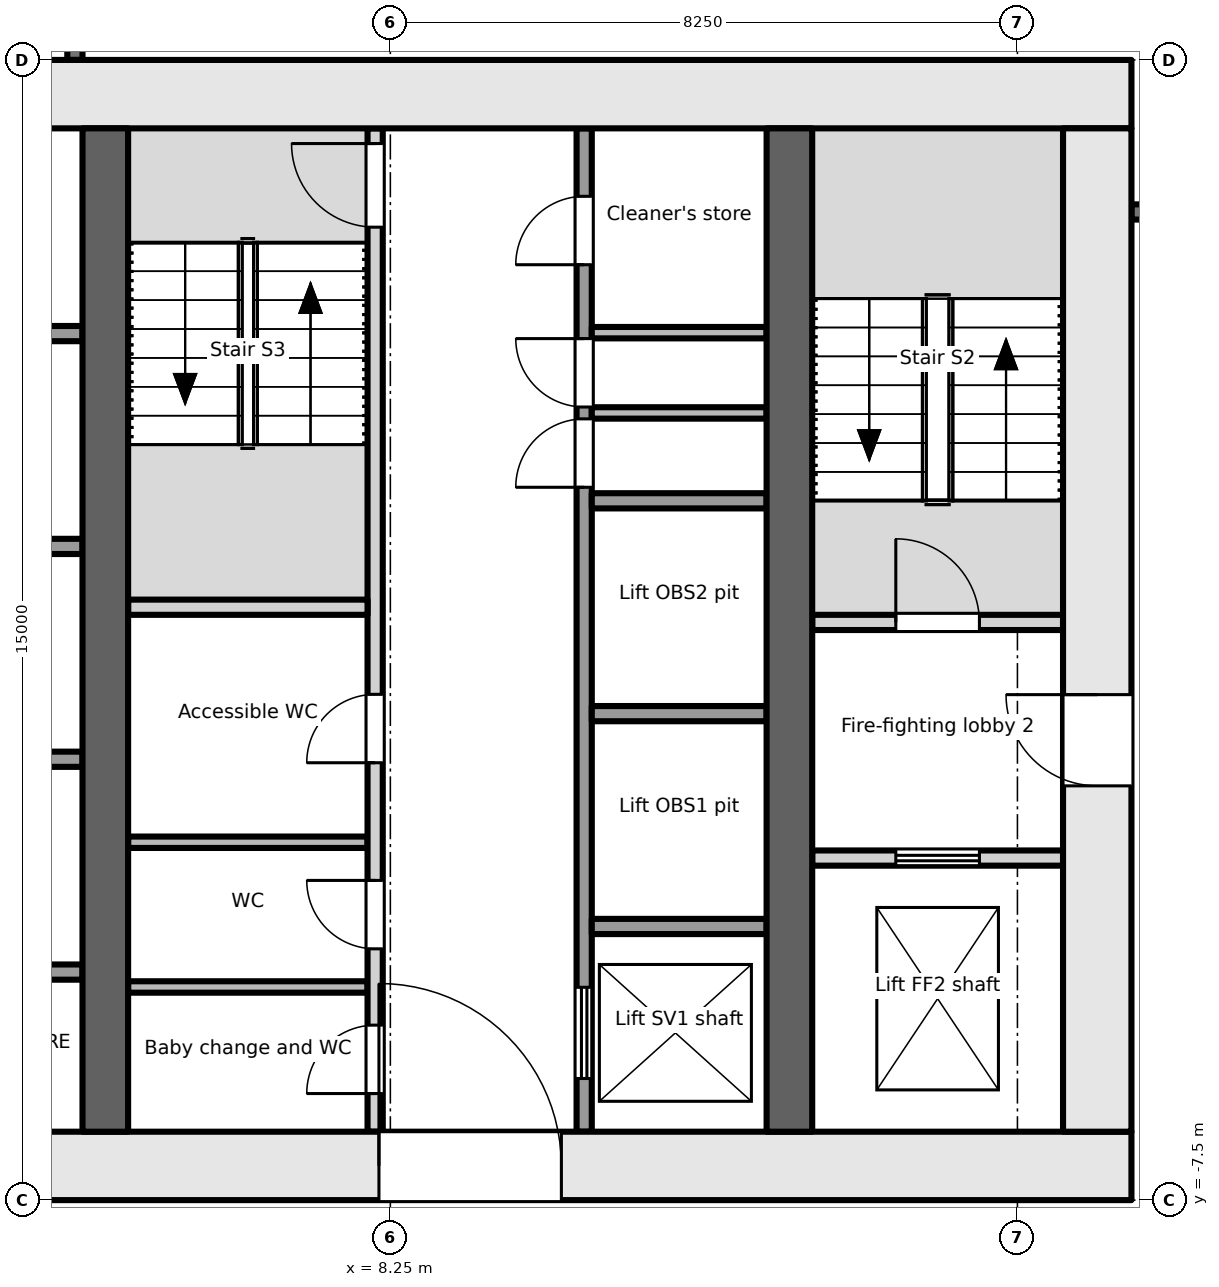
"""IFC4 building model, lengths in metres.
Left out: names, types, materials, properties, quantities, classifications, styles, units other than length and angle.
Written with IfcOpenShell. Run it as: python <this file> out.ifc"""

import sys

from ifc_helpers import new_model, si_unit, direction, frame, frame_2d, origin, place, context, subcontext, project, spatial, rectangle, extrude, element, fill, save


model = new_model("IFC4")
c1 = context("Model", 3, precision=1e-05, world=origin(), true_north=direction((0.0, 1.0)))
c2 = subcontext(c1, "Body", "Model", "MODEL_VIEW")
j1 = project(units=[si_unit("LENGTHUNIT", "METRE"), si_unit("PLANEANGLEUNIT", "RADIAN")], contexts=[c1])
p1 = place(None, origin())
s1 = spatial("IfcSite", under=j1, at=p1, CompositionType="ELEMENT")
p2 = place(p1, origin())
s2 = spatial("IfcBuilding", under=s1, at=p2, CompositionType="ELEMENT")
p3 = place(p2, frame((0.0, 0.0, -5.5)))
s3 = spatial("IfcBuildingStorey", under=s2, at=p3, CompositionType="ELEMENT", Elevation=-5.5)
p4 = place(p3, frame((-18.0, -7.05, -0.2), z_axis=(0.0, 0.0, 1.0), x_axis=(1.0, 0.0, 0.0)))
e1 = element("IfcWall", 1, at=p4, inside=s3, PredefinedType="SHEAR", context=c2, shape_type="SweptSolid", body=[
    extrude(rectangle(XDim=36.0, YDim=0.9, at=frame_2d((18.0, 0.0))), origin(), (0.0, 0.0, 1.0), 5.5),
])
p5 = place(p4, frame((7.8, 0.0, 0.2)))
e2 = element("IfcOpeningElement", 2, at=p5, cuts=e1, PredefinedType="OPENING", context=c2, shape_type="SweptSolid", body=[
    extrude(rectangle(XDim=2.4, YDim=2.1, at=frame_2d((1.2, 1.05))), frame((0.0, 0.46, 0.0), z_axis=(0.0, -1.0, 0.0), x_axis=(1.0, 0.0, 0.0)), (0.0, 0.0, 1.0), 0.921),
])
p6 = place(p4, frame((17.4, 0.0, 0.2)))
e3 = element("IfcOpeningElement", 3, at=p6, cuts=e1, PredefinedType="OPENING", context=c2, shape_type="SweptSolid", body=[
    extrude(rectangle(XDim=1.2, YDim=2.1, at=frame_2d((0.6, 1.05))), frame((0.0, 0.46, 0.0), z_axis=(0.0, -1.0, 0.0), x_axis=(1.0, 0.0, 0.0)), (0.0, 0.0, 1.0), 0.921),
])
p7 = place(p4, frame((26.1, 0.0, 0.2)))
e4 = element("IfcOpeningElement", 4, at=p7, cuts=e1, PredefinedType="OPENING", context=c2, shape_type="SweptSolid", body=[
    extrude(rectangle(XDim=2.4, YDim=2.1, at=frame_2d((1.2, 1.05))), frame((0.0, 0.46, 0.0), z_axis=(0.0, -1.0, 0.0), x_axis=(1.0, 0.0, 0.0)), (0.0, 0.0, 1.0), 0.921),
])
p8 = place(p3, frame((-18.0, 7.05, -0.2), z_axis=(0.0, 0.0, 1.0), x_axis=(1.0, 0.0, 0.0)))
e5 = element("IfcWall", 5, at=p8, inside=s3, PredefinedType="SHEAR", context=c2, shape_type="SweptSolid", body=[
    extrude(rectangle(XDim=36.0, YDim=0.9, at=frame_2d((18.0, 0.0))), origin(), (0.0, 0.0, 1.0), 5.5),
])
p9 = place(p3, frame((17.55, -6.6, -0.2), z_axis=(0.0, 0.0, 1.0), x_axis=(0.0, 1.0, 0.0)))
e6 = element("IfcWall", 6, at=p9, inside=s3, PredefinedType="SHEAR", context=c2, shape_type="SweptSolid", body=[
    extrude(rectangle(XDim=13.2, YDim=0.9, at=frame_2d((6.6, 0.0))), origin(), (0.0, 0.0, 1.0), 5.5),
])
p10 = place(p9, frame((4.55, 0.0, 0.2)))
e7 = element("IfcOpeningElement", 7, at=p10, cuts=e6, PredefinedType="OPENING", context=c2, shape_type="SweptSolid", body=[
    extrude(rectangle(XDim=1.2, YDim=2.1, at=frame_2d((0.6, 1.05))), frame((0.0, 0.46, 0.0), z_axis=(0.0, -1.0, 0.0), x_axis=(1.0, 0.0, 0.0)), (0.0, 0.0, 1.0), 0.921),
])
for number, where, z_axis, x_axis in (
    (8, (4.5, -6.6, -0.2), (0.0, 0.0, 1.0), (0.0, 1.0, 0.0)),
    (9, (13.5, -6.6, -0.2), (0.0, 0.0, 1.0), (0.0, 1.0, 0.0)),
):
    element("IfcWall", number, at=place(p3, frame(where, z_axis=z_axis, x_axis=x_axis)), inside=s3, PredefinedType="SHEAR", context=c2, shape_type="SweptSolid", body=[
        extrude(rectangle(XDim=13.2, YDim=0.6, at=frame_2d((6.6, 0.0))), origin(), (0.0, 0.0, 1.0), 5.5),
    ])
p11 = place(p3, frame((13.8, -3.0, 0.0), z_axis=(0.0, 0.0, 1.0), x_axis=(1.0, 0.0, 0.0)))
e10 = element("IfcWall", 10, at=p11, inside=s3, PredefinedType="PARTITIONING", context=c2, shape_type="SweptSolid", body=[
    extrude(rectangle(XDim=3.3, YDim=0.2, at=frame_2d((1.65, 0.0))), origin(), (0.0, 0.0, 1.0), 5.3),
])
p12 = place(p11, frame((1.1, 0.0, 0.0)))
e11 = element("IfcOpeningElement", 11, at=p12, cuts=e10, PredefinedType="OPENING", context=c2, shape_type="SweptSolid", body=[
    extrude(rectangle(XDim=1.1, YDim=2.1, at=frame_2d((0.55, 1.05))), frame((0.0, 0.111, 0.0), z_axis=(0.0, -1.0, 0.0), x_axis=(1.0, 0.0, 0.0)), (0.0, 0.0, 1.0), 0.221),
])
p13 = place(p3, frame((13.8, 0.1, 0.0), z_axis=(0.0, 0.0, 1.0), x_axis=(1.0, 0.0, 0.0)))
e12 = element("IfcWall", 12, at=p13, inside=s3, PredefinedType="PARTITIONING", context=c2, shape_type="SweptSolid", body=[
    extrude(rectangle(XDim=3.3, YDim=0.2, at=frame_2d((1.65, 0.0))), origin(), (0.0, 0.0, 1.0), 5.3),
])
p14 = place(p13, frame((1.1, 0.0, 0.0)))
e13 = element("IfcOpeningElement", 13, at=p14, cuts=e12, PredefinedType="OPENING", context=c2, shape_type="SweptSolid", body=[
    extrude(rectangle(XDim=1.1, YDim=2.1, at=frame_2d((0.55, 1.05))), frame((0.0, 0.111, 0.0), z_axis=(0.0, -1.0, 0.0), x_axis=(1.0, 0.0, 0.0)), (0.0, 0.0, 1.0), 0.221),
])
for number, where, z_axis, x_axis in (
    (14, (1.9, -1.7, 0.0), (0.0, 0.0, 1.0), (1.0, 0.0, 0.0)),
    (15, (1.9, 1.1, 0.0), (0.0, 0.0, 1.0), (1.0, 0.0, 0.0)),
    (16, (1.9, 3.9, 0.0), (0.0, 0.0, 1.0), (1.0, 0.0, 0.0)),
    (17, (1.9, -4.5, 0.0), (0.0, 0.0, 1.0), (1.0, 0.0, 0.0)),
):
    element("IfcWall", number, at=place(p3, frame(where, z_axis=z_axis, x_axis=x_axis)), inside=s3, PredefinedType="PARTITIONING", context=c2, shape_type="SweptSolid", body=[
        extrude(rectangle(XDim=2.3, YDim=0.2, at=frame_2d((1.15, 0.0))), origin(), (0.0, 0.0, 1.0), 5.3),
    ])
p15 = place(p3, frame((8.05, -6.6, 0.0), z_axis=(0.0, 0.0, 1.0), x_axis=(0.0, 1.0, 0.0)))
e18 = element("IfcWall", 18, at=p15, inside=s3, PredefinedType="PARTITIONING", context=c2, shape_type="SweptSolid", body=[
    extrude(rectangle(XDim=13.2, YDim=0.2, at=frame_2d((6.6, 0.0))), origin(), (0.0, 0.0, 1.0), 5.3),
])
p16 = place(p15, frame((0.502, 0.0, 0.0)))
e19 = element("IfcOpeningElement", 19, at=p16, cuts=e18, PredefinedType="OPENING", context=c2, shape_type="SweptSolid", body=[
    extrude(rectangle(XDim=0.9, YDim=2.1, at=frame_2d((0.45, 1.05))), frame((0.0, 0.111, 0.0), z_axis=(0.0, -1.0, 0.0), x_axis=(1.0, 0.0, 0.0)), (0.0, 0.0, 1.0), 0.221),
])
p17 = place(p15, frame((2.406, 0.0, 0.0)))
e20 = element("IfcOpeningElement", 20, at=p17, cuts=e18, PredefinedType="OPENING", context=c2, shape_type="SweptSolid", body=[
    extrude(rectangle(XDim=0.9, YDim=2.1, at=frame_2d((0.45, 1.05))), frame((0.0, 0.111, 0.0), z_axis=(0.0, -1.0, 0.0), x_axis=(1.0, 0.0, 0.0)), (0.0, 0.0, 1.0), 0.221),
])
p18 = place(p15, frame((4.854, 0.0, 0.0)))
e21 = element("IfcOpeningElement", 21, at=p18, cuts=e18, PredefinedType="OPENING", context=c2, shape_type="SweptSolid", body=[
    extrude(rectangle(XDim=0.9, YDim=2.1, at=frame_2d((0.45, 1.05))), frame((0.0, 0.111, 0.0), z_axis=(0.0, -1.0, 0.0), x_axis=(1.0, 0.0, 0.0)), (0.0, 0.0, 1.0), 0.221),
])
p19 = place(p15, frame((11.9, 0.0, 0.0)))
e22 = element("IfcOpeningElement", 22, at=p19, cuts=e18, PredefinedType="OPENING", context=c2, shape_type="SweptSolid", body=[
    extrude(rectangle(XDim=1.1, YDim=2.1, at=frame_2d((0.55, 1.05))), frame((0.0, 0.111, 0.0), z_axis=(0.0, -1.0, 0.0), x_axis=(1.0, 0.0, 0.0)), (0.0, 0.0, 1.0), 0.221),
])
p20 = place(p3, frame((10.8, -6.6, 0.0), z_axis=(0.0, 0.0, 1.0), x_axis=(0.0, 1.0, 0.0)))
e23 = element("IfcWall", 23, at=p20, inside=s3, PredefinedType="PARTITIONING", context=c2, shape_type="SweptSolid", body=[
    extrude(rectangle(XDim=13.2, YDim=0.2, at=frame_2d((6.6, 0.0))), origin(), (0.0, 0.0, 1.0), 5.3),
])
p21 = place(p20, frame((0.7, 0.0, 0.0)))
e24 = element("IfcOpeningElement", 24, at=p21, cuts=e23, PredefinedType="OPENING", context=c2, shape_type="SweptSolid", body=[
    extrude(rectangle(XDim=1.2, YDim=2.1, at=frame_2d((0.6, 1.05))), frame((0.0, 0.111, 0.0), z_axis=(0.0, -1.0, 0.0), x_axis=(1.0, 0.0, 0.0)), (0.0, 0.0, 1.0), 0.221),
])
p22 = place(p20, frame((8.478, 0.0, 0.0)))
e25 = element("IfcOpeningElement", 25, at=p22, cuts=e23, PredefinedType="OPENING", context=c2, shape_type="SweptSolid", body=[
    extrude(rectangle(XDim=0.9, YDim=2.1, at=frame_2d((0.45, 1.05))), frame((0.0, 0.111, 0.0), z_axis=(0.0, -1.0, 0.0), x_axis=(1.0, 0.0, 0.0)), (0.0, 0.0, 1.0), 0.221),
])
p23 = place(p20, frame((9.534, 0.0, 0.0)))
e26 = element("IfcOpeningElement", 26, at=p23, cuts=e23, PredefinedType="OPENING", context=c2, shape_type="SweptSolid", body=[
    extrude(rectangle(XDim=0.9, YDim=2.1, at=frame_2d((0.45, 1.05))), frame((0.0, 0.111, 0.0), z_axis=(0.0, -1.0, 0.0), x_axis=(1.0, 0.0, 0.0)), (0.0, 0.0, 1.0), 0.221),
])
p24 = place(p20, frame((11.406, 0.0, 0.0)))
e27 = element("IfcOpeningElement", 27, at=p24, cuts=e23, PredefinedType="OPENING", context=c2, shape_type="SweptSolid", body=[
    extrude(rectangle(XDim=0.9, YDim=2.1, at=frame_2d((0.45, 1.05))), frame((0.0, 0.111, 0.0), z_axis=(0.0, -1.0, 0.0), x_axis=(1.0, 0.0, 0.0)), (0.0, 0.0, 1.0), 0.221),
])
p25 = place(p3, frame((4.8, 0.3, 0.0), z_axis=(0.0, 0.0, 1.0), x_axis=(1.0, 0.0, 0.0)))
e28 = element("IfcWall", 28, at=p25, inside=s3, PredefinedType="PARTITIONING", context=c2, shape_type="SweptSolid", body=[
    extrude(rectangle(XDim=3.15, YDim=0.2, at=frame_2d((1.575, 0.0))), origin(), (0.0, 0.0, 1.0), 5.3),
])
for number, where, z_axis, x_axis in (
    (29, (4.8, -4.696, 0.0), (0.0, 0.0, 1.0), (1.0, 0.0, 0.0)),
    (30, (4.8, -2.792, 0.0), (0.0, 0.0, 1.0), (1.0, 0.0, 0.0)),
):
    element("IfcWall", number, at=place(p3, frame(where, z_axis=z_axis, x_axis=x_axis)), inside=s3, PredefinedType="PARTITIONING", context=c2, shape_type="SweptSolid", body=[
        extrude(rectangle(XDim=3.15, YDim=0.15, at=frame_2d((1.575, 0.0))), origin(), (0.0, 0.0, 1.0), 5.3),
    ])
for number, where, z_axis, x_axis in (
    (31, (10.9, -3.9, 0.0), (0.0, 0.0, 1.0), (1.0, 0.0, 0.0)),
    (32, (10.9, -1.1, 0.0), (0.0, 0.0, 1.0), (1.0, 0.0, 0.0)),
    (33, (10.9, 1.7, 0.0), (0.0, 0.0, 1.0), (1.0, 0.0, 0.0)),
):
    element("IfcWall", number, at=place(p3, frame(where, z_axis=z_axis, x_axis=x_axis)), inside=s3, PredefinedType="PARTITIONING", context=c2, shape_type="SweptSolid", body=[
        extrude(rectangle(XDim=2.3, YDim=0.2, at=frame_2d((1.15, 0.0))), origin(), (0.0, 0.0, 1.0), 5.3),
    ])
for number, where, z_axis, x_axis in (
    (34, (10.9, 2.856, 0.0), (0.0, 0.0, 1.0), (1.0, 0.0, 0.0)),
    (35, (10.9, 3.912, 0.0), (0.0, 0.0, 1.0), (1.0, 0.0, 0.0)),
):
    element("IfcWall", number, at=place(p3, frame(where, z_axis=z_axis, x_axis=x_axis)), inside=s3, PredefinedType="PARTITIONING", context=c2, shape_type="SweptSolid", body=[
        extrude(rectangle(XDim=2.3, YDim=0.15, at=frame_2d((1.15, 0.0))), origin(), (0.0, 0.0, 1.0), 5.3),
    ])
p26 = place(p3, frame((18.0, 5.5, 0.0), z_axis=(0.0, 0.0, 1.0), x_axis=(1.0, 0.0, 0.0)))
e36 = element("IfcWall", 36, at=p26, inside=s3, PredefinedType="PARTITIONING", context=c2, shape_type="SweptSolid", body=[
    extrude(rectangle(XDim=2.4, YDim=0.2, at=frame_2d((1.2, 0.0))), origin(), (0.0, 0.0, 1.0), 5.3),
])
p27 = place(p26, frame((0.75, 0.0, 0.0)))
e37 = element("IfcOpeningElement", 37, at=p27, cuts=e36, PredefinedType="OPENING", context=c2, shape_type="SweptSolid", body=[
    extrude(rectangle(XDim=0.9, YDim=2.1, at=frame_2d((0.45, 1.05))), frame((0.0, 0.111, 0.0), z_axis=(0.0, -1.0, 0.0), x_axis=(1.0, 0.0, 0.0)), (0.0, 0.0, 1.0), 0.221),
])
p28 = place(p3, frame((4.1, 13.74, 0.0), z_axis=(0.0, 0.0, 1.0), x_axis=(0.0, -1.0, 0.0)))
e38 = element("IfcWall", 38, at=p28, inside=s3, PredefinedType="PARTITIONING", context=c2, shape_type="SweptSolid", body=[
    extrude(rectangle(XDim=6.24, YDim=0.2, at=frame_2d((3.12, 0.0))), origin(), (0.0, 0.0, 1.0), 4.3),
])
p29 = place(p12, origin())
e39 = element("IfcDoor", 39, at=p29, inside=s3, OperationType="DOUBLE_DOOR_SLIDING", PredefinedType="DOOR", context=c2, shape_type="SweptSolid", body=[
    extrude(rectangle(XDim=1.1, YDim=2.1, at=frame_2d((0.55, 1.05))), frame((0.0, 0.025, 0.0), z_axis=(0.0, -1.0, 0.0), x_axis=(1.0, 0.0, 0.0)), (0.0, 0.0, 1.0), 0.05),
])
fill(e11, e39)
p30 = place(p10, origin())
e40 = element("IfcDoor", 40, at=p30, inside=s3, OperationType="SINGLE_SWING_RIGHT", PredefinedType="DOOR", context=c2, shape_type="SweptSolid", body=[
    extrude(rectangle(XDim=1.2, YDim=2.1, at=frame_2d((0.6, 1.05))), frame((0.0, 0.025, 0.0), z_axis=(0.0, -1.0, 0.0), x_axis=(1.0, 0.0, 0.0)), (0.0, 0.0, 1.0), 0.05),
])
fill(e7, e40)
p31 = place(p14, origin())
e41 = element("IfcDoor", 41, at=p31, inside=s3, OperationType="SINGLE_SWING_LEFT", PredefinedType="DOOR", context=c2, shape_type="SweptSolid", body=[
    extrude(rectangle(XDim=1.1, YDim=2.1, at=frame_2d((0.55, 1.05))), frame((0.0, 0.025, 0.0), z_axis=(0.0, -1.0, 0.0), x_axis=(1.0, 0.0, 0.0)), (0.0, 0.0, 1.0), 0.05),
])
fill(e13, e41)
p32 = place(p16, origin())
e42 = element("IfcDoor", 42, at=p32, inside=s3, OperationType="SINGLE_SWING_LEFT", PredefinedType="DOOR", context=c2, shape_type="SweptSolid", body=[
    extrude(rectangle(XDim=0.9, YDim=2.1, at=frame_2d((0.45, 1.05))), frame((0.0, 0.025, 0.0), z_axis=(0.0, -1.0, 0.0), x_axis=(1.0, 0.0, 0.0)), (0.0, 0.0, 1.0), 0.05),
])
fill(e19, e42)
p33 = place(p17, origin())
e43 = element("IfcDoor", 43, at=p33, inside=s3, OperationType="SINGLE_SWING_RIGHT", PredefinedType="DOOR", context=c2, shape_type="SweptSolid", body=[
    extrude(rectangle(XDim=0.9, YDim=2.1, at=frame_2d((0.45, 1.05))), frame((0.0, 0.025, 0.0), z_axis=(0.0, -1.0, 0.0), x_axis=(1.0, 0.0, 0.0)), (0.0, 0.0, 1.0), 0.05),
])
fill(e20, e43)
p34 = place(p18, origin())
e44 = element("IfcDoor", 44, at=p34, inside=s3, OperationType="SINGLE_SWING_LEFT", PredefinedType="DOOR", context=c2, shape_type="SweptSolid", body=[
    extrude(rectangle(XDim=0.9, YDim=2.1, at=frame_2d((0.45, 1.05))), frame((0.0, 0.025, 0.0), z_axis=(0.0, -1.0, 0.0), x_axis=(1.0, 0.0, 0.0)), (0.0, 0.0, 1.0), 0.05),
])
fill(e21, e44)
p35 = place(p19, origin())
e45 = element("IfcDoor", 45, at=p35, inside=s3, OperationType="SINGLE_SWING_RIGHT", PredefinedType="DOOR", context=c2, shape_type="SweptSolid", body=[
    extrude(rectangle(XDim=1.1, YDim=2.1, at=frame_2d((0.55, 1.05))), frame((0.0, 0.025, 0.0), z_axis=(0.0, -1.0, 0.0), x_axis=(1.0, 0.0, 0.0)), (0.0, 0.0, 1.0), 0.05),
])
fill(e22, e45)
p36 = place(p7, origin())
e46 = element("IfcDoor", 46, at=p36, inside=s3, OperationType="DOUBLE_DOOR_DOUBLE_SWING", PredefinedType="DOOR", context=c2, shape_type="SweptSolid", body=[
    extrude(rectangle(XDim=2.4, YDim=2.1, at=frame_2d((1.2, 1.05))), frame((0.0, 0.025, 0.0), z_axis=(0.0, -1.0, 0.0), x_axis=(1.0, 0.0, 0.0)), (0.0, 0.0, 1.0), 0.05),
])
fill(e4, e46)
p37 = place(p21, origin())
e47 = element("IfcDoor", 47, at=p37, inside=s3, OperationType="DOUBLE_DOOR_SLIDING", PredefinedType="DOOR", context=c2, shape_type="SweptSolid", body=[
    extrude(rectangle(XDim=1.2, YDim=2.1, at=frame_2d((0.6, 1.05))), frame((0.0, 0.025, 0.0), z_axis=(0.0, -1.0, 0.0), x_axis=(1.0, 0.0, 0.0)), (0.0, 0.0, 1.0), 0.05),
])
fill(e24, e47)
p38 = place(p22, origin())
e48 = element("IfcDoor", 48, at=p38, inside=s3, OperationType="SINGLE_SWING_LEFT", PredefinedType="DOOR", context=c2, shape_type="SweptSolid", body=[
    extrude(rectangle(XDim=0.9, YDim=2.1, at=frame_2d((0.45, 1.05))), frame((0.0, 0.025, 0.0), z_axis=(0.0, -1.0, 0.0), x_axis=(1.0, 0.0, 0.0)), (0.0, 0.0, 1.0), 0.05),
])
fill(e25, e48)
p39 = place(p23, origin())
e49 = element("IfcDoor", 49, at=p39, inside=s3, OperationType="SINGLE_SWING_RIGHT", PredefinedType="DOOR", context=c2, shape_type="SweptSolid", body=[
    extrude(rectangle(XDim=0.9, YDim=2.1, at=frame_2d((0.45, 1.05))), frame((0.0, 0.025, 0.0), z_axis=(0.0, -1.0, 0.0), x_axis=(1.0, 0.0, 0.0)), (0.0, 0.0, 1.0), 0.05),
])
fill(e26, e49)
p40 = place(p24, origin())
e50 = element("IfcDoor", 50, at=p40, inside=s3, OperationType="SINGLE_SWING_LEFT", PredefinedType="DOOR", context=c2, shape_type="SweptSolid", body=[
    extrude(rectangle(XDim=0.9, YDim=2.1, at=frame_2d((0.45, 1.05))), frame((0.0, 0.025, 0.0), z_axis=(0.0, -1.0, 0.0), x_axis=(1.0, 0.0, 0.0)), (0.0, 0.0, 1.0), 0.05),
])
fill(e27, e50)
save(model, sys.argv[1])
